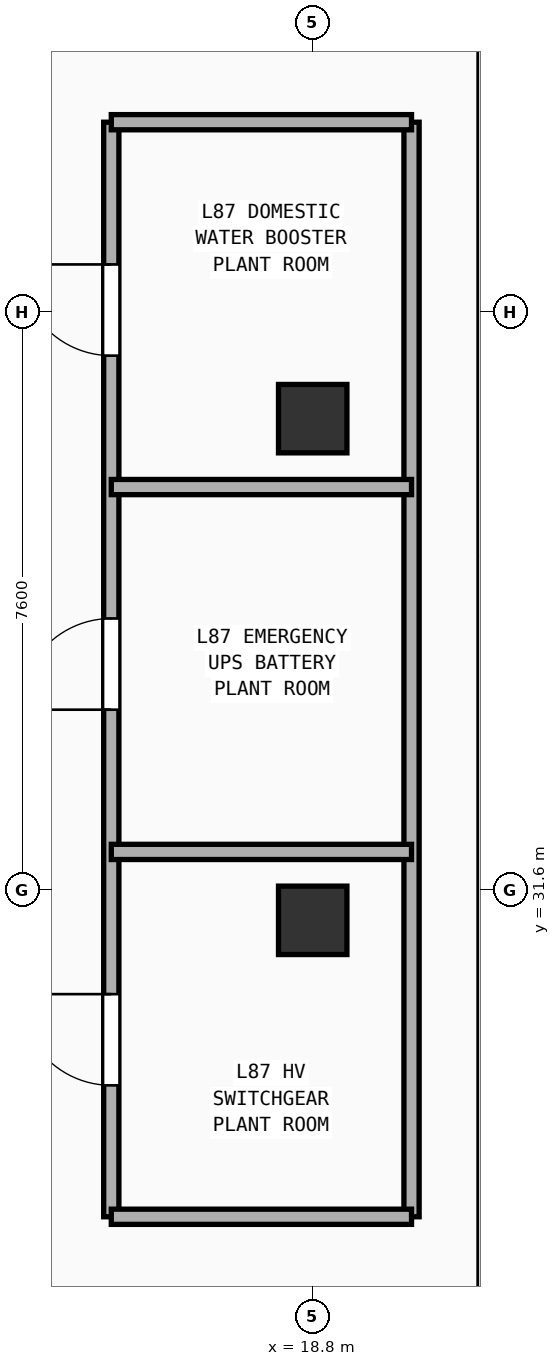
"""IFC4 building model, lengths in metres.
Left out: names, types, materials, properties, quantities, classifications, styles, units other than length and angle.
Written with IfcOpenShell. Run it as: python <this file> out.ifc"""

import sys

from ifc_helpers import new_model, si_unit, direction, frame, frame_2d, origin, origin_2d, place, context, subcontext, project, spatial, rectangle, extrude, element, fill, save


model = new_model("IFC4")
c1 = context("Model", 3, precision=1e-05, world=origin(), true_north=direction((0.0, 1.0)))
c2 = subcontext(c1, "Body", "Model", "MODEL_VIEW")
j1 = project(units=[si_unit("LENGTHUNIT", "METRE"), si_unit("PLANEANGLEUNIT", "RADIAN")], contexts=[c1])
p1 = place(None, origin())
s1 = spatial("IfcSite", under=j1, at=p1, CompositionType="ELEMENT")
p2 = place(p1, origin())
s2 = spatial("IfcBuilding", under=s1, at=p2, CompositionType="ELEMENT")
p3 = place(p2, frame((0.0, 0.0, 338.8)))
s3 = spatial("IfcBuildingStorey", under=s2, at=p3, CompositionType="ELEMENT", Elevation=338.8)
for number, where, z_axis, x_axis in (
    (1, (18.8, 31.2, 0.0), (0.0, 0.0, 1.0), (1.0, 0.0, 0.0)),
    (2, (18.8, 37.8, 0.0), (0.0, 0.0, 1.0), (1.0, 0.0, 0.0)),
):
    element("IfcColumn", number, at=place(p3, frame(where, z_axis=z_axis, x_axis=x_axis)), inside=s3, PredefinedType="COLUMN", context=c2, shape_type="SweptSolid", body=[
        extrude(rectangle(XDim=0.9, YDim=0.9, at=origin_2d()), origin(), (0.0, 0.0, 1.0), 5.02),
    ])
p4 = place(p3, frame((16.15, 27.3, 0.0), z_axis=(0.0, 0.0, 1.0), x_axis=(0.0, 1.0, 0.0)))
e3 = element("IfcWall", 3, at=p4, inside=s3, PredefinedType="PARTITIONING", context=c2, shape_type="SweptSolid", body=[
    extrude(rectangle(XDim=14.4, YDim=0.2, at=frame_2d((7.2, 0.0))), origin(), (0.0, 0.0, 1.0), 5.02),
])
p5 = place(p4, frame((1.729, 0.0, 0.0)))
e4 = element("IfcOpeningElement", 4, at=p5, cuts=e3, PredefinedType="OPENING", context=c2, shape_type="SweptSolid", body=[
    extrude(rectangle(XDim=1.2, YDim=2.25, at=frame_2d((0.6, 1.125))), frame((0.0, 0.11, 0.0), z_axis=(0.0, -1.0, 0.0), x_axis=(1.0, 0.0, 0.0)), (0.0, 0.0, 1.0), 0.22),
])
p6 = place(p4, frame((6.671, 0.0, 0.0)))
e5 = element("IfcOpeningElement", 5, at=p6, cuts=e3, PredefinedType="OPENING", context=c2, shape_type="SweptSolid", body=[
    extrude(rectangle(XDim=1.2, YDim=2.25, at=frame_2d((0.6, 1.125))), frame((0.0, 0.11, 0.0), z_axis=(0.0, -1.0, 0.0), x_axis=(1.0, 0.0, 0.0)), (0.0, 0.0, 1.0), 0.22),
])
p7 = place(p4, frame((11.329, 0.0, 0.0)))
e6 = element("IfcOpeningElement", 6, at=p7, cuts=e3, PredefinedType="OPENING", context=c2, shape_type="SweptSolid", body=[
    extrude(rectangle(XDim=1.2, YDim=2.25, at=frame_2d((0.6, 1.125))), frame((0.0, 0.11, 0.0), z_axis=(0.0, -1.0, 0.0), x_axis=(1.0, 0.0, 0.0)), (0.0, 0.0, 1.0), 0.22),
])
p8 = place(p3, frame((20.1, 27.3, 0.0), z_axis=(0.0, 0.0, 1.0), x_axis=(0.0, 1.0, 0.0)))
e7 = element("IfcWall", 7, at=p8, inside=s3, PredefinedType="PARTITIONING", context=c2, shape_type="SweptSolid", body=[
    extrude(rectangle(XDim=14.4, YDim=0.2, at=frame_2d((7.2, 0.0))), origin(), (0.0, 0.0, 1.0), 5.02),
])
for number, where, z_axis, x_axis in (
    (8, (16.15, 27.3, 0.0), (0.0, 0.0, 1.0), (1.0, 0.0, 0.0)),
    (9, (16.15, 41.7, 0.0), (0.0, 0.0, 1.0), (1.0, 0.0, 0.0)),
    (10, (16.15, 32.1, 0.0), (0.0, 0.0, 1.0), (1.0, 0.0, 0.0)),
    (11, (16.15, 36.9, 0.0), (0.0, 0.0, 1.0), (1.0, 0.0, 0.0)),
):
    element("IfcWall", number, at=place(p3, frame(where, z_axis=z_axis, x_axis=x_axis)), inside=s3, PredefinedType="PARTITIONING", context=c2, shape_type="SweptSolid", body=[
        extrude(rectangle(XDim=3.95, YDim=0.2, at=frame_2d((1.975, 0.0))), origin(), (0.0, 0.0, 1.0), 5.02),
    ])
p9 = place(p5, origin())
e12 = element("IfcDoor", 12, at=p9, inside=s3, OperationType="SINGLE_SWING_RIGHT", PredefinedType="DOOR", context=c2, shape_type="SweptSolid", body=[
    extrude(rectangle(XDim=1.2, YDim=2.25, at=frame_2d((0.6, 1.125))), frame((0.0, 0.025, 0.0), z_axis=(0.0, -1.0, 0.0), x_axis=(1.0, 0.0, 0.0)), (0.0, 0.0, 1.0), 0.05),
])
fill(e4, e12)
p10 = place(p6, origin())
e13 = element("IfcDoor", 13, at=p10, inside=s3, OperationType="SINGLE_SWING_LEFT", PredefinedType="DOOR", context=c2, shape_type="SweptSolid", body=[
    extrude(rectangle(XDim=1.2, YDim=2.25, at=frame_2d((0.6, 1.125))), frame((0.0, 0.025, 0.0), z_axis=(0.0, -1.0, 0.0), x_axis=(1.0, 0.0, 0.0)), (0.0, 0.0, 1.0), 0.05),
])
fill(e5, e13)
p11 = place(p7, origin())
e14 = element("IfcDoor", 14, at=p11, inside=s3, OperationType="SINGLE_SWING_RIGHT", PredefinedType="DOOR", context=c2, shape_type="SweptSolid", body=[
    extrude(rectangle(XDim=1.2, YDim=2.25, at=frame_2d((0.6, 1.125))), frame((0.0, 0.025, 0.0), z_axis=(0.0, -1.0, 0.0), x_axis=(1.0, 0.0, 0.0)), (0.0, 0.0, 1.0), 0.05),
])
fill(e6, e14)
save(model, sys.argv[1])
